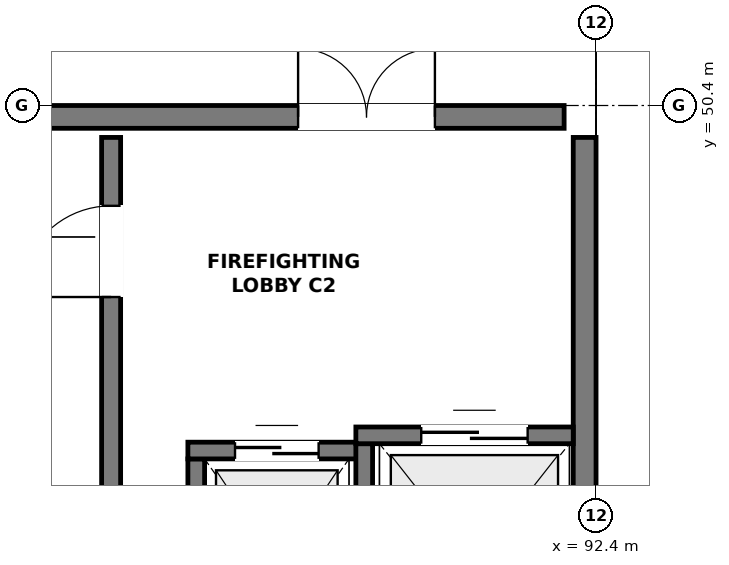
"""IFC4 building model, lengths in metres.
Left out: names, types, materials, properties, quantities, classifications, styles, units other than length and angle.
Written with IfcOpenShell. Run it as: python <this file> out.ifc"""

import sys

from ifc_helpers import new_model, si_unit, direction, frame, frame_2d, origin, place, context, subcontext, project, spatial, rectangle, extrude, element, fill, save


model = new_model("IFC4")
c1 = context("Model", 3, precision=1e-05, world=origin(), true_north=direction((0.0, 1.0)))
c2 = subcontext(c1, "Body", "Model", "MODEL_VIEW")
j1 = project(units=[si_unit("LENGTHUNIT", "METRE"), si_unit("PLANEANGLEUNIT", "RADIAN")], contexts=[c1])
p1 = place(None, origin())
s1 = spatial("IfcSite", under=j1, at=p1, CompositionType="ELEMENT")
p2 = place(p1, origin())
s2 = spatial("IfcBuilding", under=s1, at=p2, CompositionType="ELEMENT")
p3 = place(p2, origin())
s3 = spatial("IfcBuildingStorey", under=s2, at=p3, CompositionType="ELEMENT", Elevation=0.0)
p4 = place(p3, frame((76.02, 50.25, 0.0), z_axis=(0.0, 0.0, 1.0), x_axis=(1.0, 0.0, 0.0)))
e1 = element("IfcWall", 1, at=p4, inside=s3, PredefinedType="SHEAR", context=c2, shape_type="SweptSolid", body=[
    extrude(rectangle(XDim=15.96, YDim=0.3, at=frame_2d((7.98, 0.0))), origin(), (0.0, 0.0, 1.0), 4.7),
])
p5 = place(p4, frame((12.46, 0.0, 0.0)))
e2 = element("IfcOpeningElement", 2, at=p5, cuts=e1, PredefinedType="OPENING", context=c2, shape_type="SweptSolid", body=[
    extrude(rectangle(XDim=1.8, YDim=2.2, at=frame_2d((0.9, 1.1))), frame((0.0, 0.162, 0.0), z_axis=(0.0, -1.0, 0.0), x_axis=(1.0, 0.0, 0.0)), (0.0, 0.0, 1.0), 0.324),
])
p6 = place(p3, frame((92.25, 42.42, 0.0), z_axis=(0.0, 0.0, 1.0), x_axis=(0.0, 1.0, 0.0)))
e3 = element("IfcWall", 3, at=p6, inside=s3, PredefinedType="SHEAR", context=c2, shape_type="SweptSolid", body=[
    extrude(rectangle(XDim=7.56, YDim=0.3, at=frame_2d((3.78, 0.0))), origin(), (0.0, 0.0, 1.0), 4.7),
])
p7 = place(p3, frame((86.02, 42.42, 0.0), z_axis=(0.0, 0.0, 1.0), x_axis=(0.0, 1.0, 0.0)))
e4 = element("IfcWall", 4, at=p7, inside=s3, PredefinedType="SHEAR", context=c2, shape_type="SweptSolid", body=[
    extrude(rectangle(XDim=7.56, YDim=0.25, at=frame_2d((3.78, 0.0))), origin(), (0.0, 0.0, 1.0), 4.7),
])
p8 = place(p7, frame((5.46, 0.0, 0.0)))
e5 = element("IfcOpeningElement", 5, at=p8, cuts=e4, PredefinedType="OPENING", context=c2, shape_type="SweptSolid", body=[
    extrude(rectangle(XDim=1.2, YDim=2.2, at=frame_2d((0.6, 1.1))), frame((0.0, 0.137, 0.0), z_axis=(0.0, -1.0, 0.0), x_axis=(1.0, 0.0, 0.0)), (0.0, 0.0, 1.0), 0.274),
])
p9 = place(p3, frame((87.14, 43.05, 0.0), z_axis=(0.0, 0.0, 1.0), x_axis=(0.0, 1.0, 0.0)))
e6 = element("IfcWall", 6, at=p9, inside=s3, PredefinedType="SOLIDWALL", context=c2, shape_type="SweptSolid", body=[
    extrude(rectangle(XDim=2.7, YDim=0.22, at=frame_2d((1.35, 0.0))), origin(), (0.0, 0.0, 1.0), 4.7),
])
p10 = place(p3, frame((87.03, 45.86, 0.0), z_axis=(0.0, 0.0, 1.0), x_axis=(1.0, 0.0, 0.0)))
e7 = element("IfcWall", 7, at=p10, inside=s3, PredefinedType="SOLIDWALL", context=c2, shape_type="SweptSolid", body=[
    extrude(rectangle(XDim=2.43, YDim=0.22, at=frame_2d((1.215, 0.0))), origin(), (0.0, 0.0, 1.0), 4.7),
])
p11 = place(p10, frame((0.62, 0.0, 0.0)))
e8 = element("IfcOpeningElement", 8, at=p11, cuts=e7, PredefinedType="OPENING", context=c2, shape_type="SweptSolid", body=[
    extrude(rectangle(XDim=1.1, YDim=2.15, at=frame_2d((0.55, 1.075))), frame((0.0, 0.122, 0.0), z_axis=(0.0, -1.0, 0.0), x_axis=(1.0, 0.0, 0.0)), (0.0, 0.0, 1.0), 0.244),
])
p12 = place(p3, frame((89.35, 42.85, 0.0), z_axis=(0.0, 0.0, 1.0), x_axis=(0.0, 1.0, 0.0)))
e9 = element("IfcWall", 9, at=p12, inside=s3, PredefinedType="SOLIDWALL", context=c2, shape_type="SweptSolid", body=[
    extrude(rectangle(XDim=3.1, YDim=0.22, at=frame_2d((1.55, 0.0))), origin(), (0.0, 0.0, 1.0), 4.7),
])
p13 = place(p3, frame((89.24, 46.06, 0.0), z_axis=(0.0, 0.0, 1.0), x_axis=(1.0, 0.0, 0.0)))
e10 = element("IfcWall", 10, at=p13, inside=s3, PredefinedType="SOLIDWALL", context=c2, shape_type="SweptSolid", body=[
    extrude(rectangle(XDim=2.86, YDim=0.22, at=frame_2d((1.43, 0.0))), origin(), (0.0, 0.0, 1.0), 4.7),
])
p14 = place(p13, frame((0.86, 0.0, 0.0)))
e11 = element("IfcOpeningElement", 11, at=p14, cuts=e10, PredefinedType="OPENING", context=c2, shape_type="SweptSolid", body=[
    extrude(rectangle(XDim=1.4, YDim=2.2, at=frame_2d((0.7, 1.1))), frame((0.0, 0.122, 0.0), z_axis=(0.0, -1.0, 0.0), x_axis=(1.0, 0.0, 0.0)), (0.0, 0.0, 1.0), 0.244),
])
p15 = place(p5, origin())
e12 = element("IfcDoor", 12, at=p15, inside=s3, OperationType="DOUBLE_DOOR_SINGLE_SWING", PredefinedType="DOOR", context=c2, shape_type="SweptSolid", body=[
    extrude(rectangle(XDim=1.8, YDim=2.2, at=frame_2d((0.9, 1.1))), frame((0.0, 0.025, 0.0), z_axis=(0.0, -1.0, 0.0), x_axis=(1.0, 0.0, 0.0)), (0.0, 0.0, 1.0), 0.05),
])
fill(e2, e12)
p16 = place(p8, origin())
e13 = element("IfcDoor", 13, at=p16, inside=s3, OperationType="SINGLE_SWING_LEFT", PredefinedType="DOOR", context=c2, shape_type="SweptSolid", body=[
    extrude(rectangle(XDim=1.2, YDim=2.2, at=frame_2d((0.6, 1.1))), frame((0.0, 0.025, 0.0), z_axis=(0.0, -1.0, 0.0), x_axis=(1.0, 0.0, 0.0)), (0.0, 0.0, 1.0), 0.05),
])
fill(e5, e13)
p17 = place(p11, origin())
e14 = element("IfcDoor", 14, at=p17, inside=s3, OperationType="DOUBLE_DOOR_SLIDING", PredefinedType="DOOR", context=c2, shape_type="SweptSolid", body=[
    extrude(rectangle(XDim=1.1, YDim=2.15, at=frame_2d((0.55, 1.075))), frame((0.0, 0.025, 0.0), z_axis=(0.0, -1.0, 0.0), x_axis=(1.0, 0.0, 0.0)), (0.0, 0.0, 1.0), 0.05),
])
fill(e8, e14)
p18 = place(p14, origin())
e15 = element("IfcDoor", 15, at=p18, inside=s3, OperationType="DOUBLE_DOOR_SLIDING", PredefinedType="DOOR", context=c2, shape_type="SweptSolid", body=[
    extrude(rectangle(XDim=1.4, YDim=2.2, at=frame_2d((0.7, 1.1))), frame((0.0, 0.025, 0.0), z_axis=(0.0, -1.0, 0.0), x_axis=(1.0, 0.0, 0.0)), (0.0, 0.0, 1.0), 0.05),
])
fill(e11, e15)
save(model, sys.argv[1])
